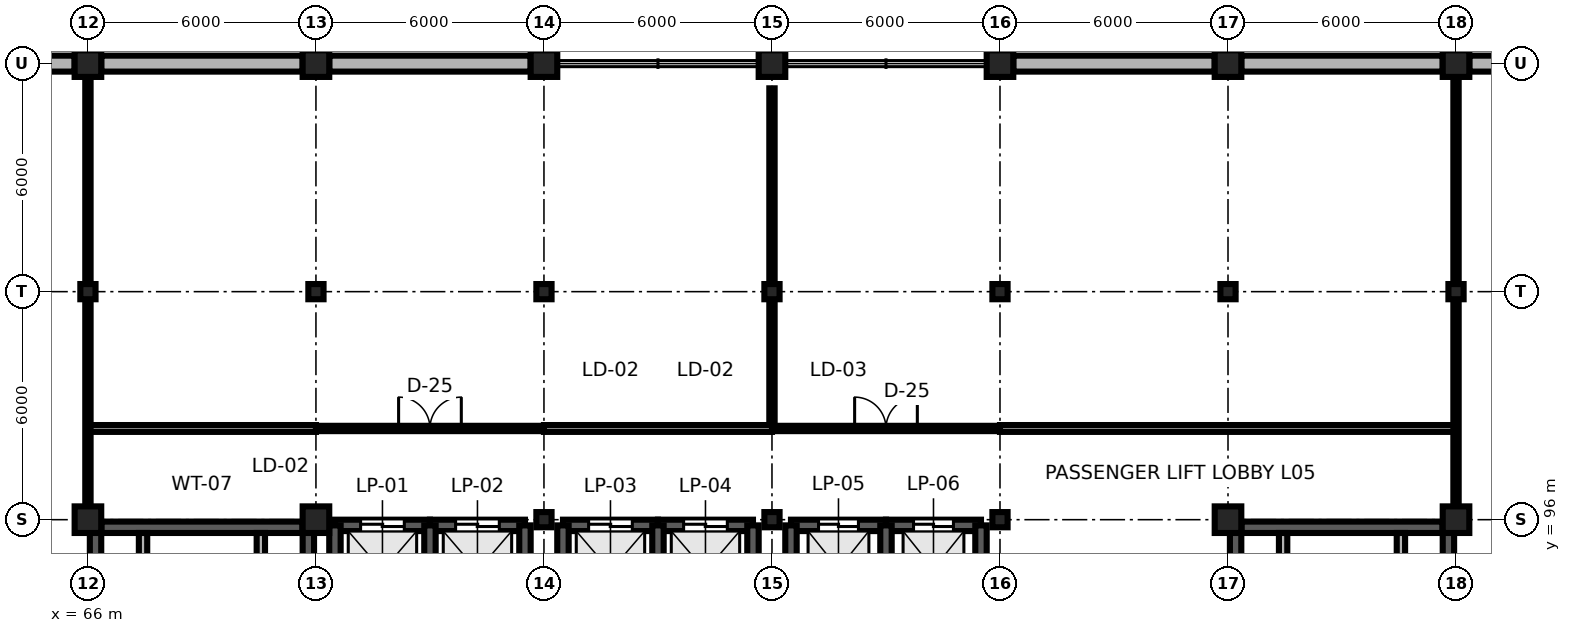
"""IFC4 building model, lengths in metres.
Left out: names, types, materials, properties, quantities, classifications, styles, units other than length and angle.
Written with IfcOpenShell. Run it as: python <this file> out.ifc"""

import sys

from ifc_helpers import new_model, si_unit, direction, frame, frame_2d, origin, origin_2d, place, context, subcontext, project, spatial, rectangle, i_section, extrude, element, fill, save


model = new_model("IFC4")
c1 = context("Model", 3, precision=1e-05, world=origin(), true_north=direction((0.0, 1.0)))
c2 = subcontext(c1, "Body", "Model", "MODEL_VIEW")
j1 = project(units=[si_unit("LENGTHUNIT", "METRE"), si_unit("PLANEANGLEUNIT", "RADIAN")], contexts=[c1])
p1 = place(None, origin())
s1 = spatial("IfcSite", under=j1, at=p1, CompositionType="ELEMENT")
p2 = place(p1, origin())
s2 = spatial("IfcBuilding", under=s1, at=p2, CompositionType="ELEMENT")
p3 = place(p2, frame((0.0, 0.0, 21.0)))
s3 = spatial("IfcBuildingStorey", under=s2, at=p3, CompositionType="ELEMENT", Elevation=21.0)
for number, where, z_axis, x_axis in (
    (1, (66.0, 96.0, 0.0), (0.0, 0.0, 1.0), (1.0, 0.0, 0.0)),
    (2, (72.0, 96.0, 0.0), (0.0, 0.0, 1.0), (1.0, 0.0, 0.0)),
):
    element("IfcColumn", number, at=place(p3, frame(where, z_axis=z_axis, x_axis=x_axis)), inside=s3, PredefinedType="COLUMN", context=c2, shape_type="SweptSolid", body=[
        extrude(rectangle(XDim=0.7, YDim=0.7, at=origin_2d()), origin(), (0.0, 0.0, 1.0), 3.9),
    ])
for number, where, z_axis, x_axis in (
    (3, (78.0, 96.0, 0.0), (0.0, 0.0, 1.0), (1.0, 0.0, 0.0)),
    (4, (84.0, 96.0, 0.0), (0.0, 0.0, 1.0), (1.0, 0.0, 0.0)),
    (5, (90.0, 96.0, 0.0), (0.0, 0.0, 1.0), (1.0, 0.0, 0.0)),
):
    element("IfcColumn", number, at=place(p3, frame(where, z_axis=z_axis, x_axis=x_axis)), inside=s3, PredefinedType="COLUMN", context=c2, shape_type="SweptSolid", body=[
        extrude(i_section(OverallWidth=0.4, OverallDepth=0.4, WebThickness=0.013, FlangeThickness=0.021, FilletRadius=0.022, at=origin_2d()), origin(), (0.0, 0.0, 1.0), 3.9),
    ])
for number, where, z_axis, x_axis in (
    (6, (96.0, 96.0, 0.0), (0.0, 0.0, 1.0), (1.0, 0.0, 0.0)),
    (7, (102.0, 96.0, 0.0), (0.0, 0.0, 1.0), (1.0, 0.0, 0.0)),
):
    element("IfcColumn", number, at=place(p3, frame(where, z_axis=z_axis, x_axis=x_axis)), inside=s3, PredefinedType="COLUMN", context=c2, shape_type="SweptSolid", body=[
        extrude(rectangle(XDim=0.7, YDim=0.7, at=origin_2d()), origin(), (0.0, 0.0, 1.0), 3.9),
    ])
for number, where, z_axis, x_axis in (
    (8, (66.0, 102.0, 0.0), (0.0, 0.0, 1.0), (1.0, 0.0, 0.0)),
    (9, (72.0, 102.0, 0.0), (0.0, 0.0, 1.0), (1.0, 0.0, 0.0)),
    (10, (78.0, 102.0, 0.0), (0.0, 0.0, 1.0), (1.0, 0.0, 0.0)),
    (11, (84.0, 102.0, 0.0), (0.0, 0.0, 1.0), (1.0, 0.0, 0.0)),
    (12, (90.0, 102.0, 0.0), (0.0, 0.0, 1.0), (1.0, 0.0, 0.0)),
    (13, (96.0, 102.0, 0.0), (0.0, 0.0, 1.0), (1.0, 0.0, 0.0)),
    (14, (102.0, 102.0, 0.0), (0.0, 0.0, 1.0), (1.0, 0.0, 0.0)),
):
    element("IfcColumn", number, at=place(p3, frame(where, z_axis=z_axis, x_axis=x_axis)), inside=s3, PredefinedType="COLUMN", context=c2, shape_type="SweptSolid", body=[
        extrude(i_section(OverallWidth=0.4, OverallDepth=0.4, WebThickness=0.013, FlangeThickness=0.021, FilletRadius=0.022, at=origin_2d()), origin(), (0.0, 0.0, 1.0), 3.9),
    ])
for number, where, z_axis, x_axis in (
    (15, (66.0, 108.0, 0.0), (0.0, 0.0, 1.0), (1.0, 0.0, 0.0)),
    (16, (72.0, 108.0, 0.0), (0.0, 0.0, 1.0), (1.0, 0.0, 0.0)),
    (17, (78.0, 108.0, 0.0), (0.0, 0.0, 1.0), (1.0, 0.0, 0.0)),
    (18, (84.0, 108.0, 0.0), (0.0, 0.0, 1.0), (1.0, 0.0, 0.0)),
    (19, (90.0, 108.0, 0.0), (0.0, 0.0, 1.0), (1.0, 0.0, 0.0)),
    (20, (96.0, 108.0, 0.0), (0.0, 0.0, 1.0), (1.0, 0.0, 0.0)),
    (21, (102.0, 108.0, 0.0), (0.0, 0.0, 1.0), (1.0, 0.0, 0.0)),
):
    element("IfcColumn", number, at=place(p3, frame(where, z_axis=z_axis, x_axis=x_axis)), inside=s3, PredefinedType="COLUMN", context=c2, shape_type="SweptSolid", body=[
        extrude(rectangle(XDim=0.7, YDim=0.7, at=origin_2d()), origin(), (0.0, 0.0, 1.0), 3.9),
    ])
for number, where, z_axis, x_axis in (
    (22, (60.35, 108.0, 0.0), (0.0, 0.0, 1.0), (1.0, 0.0, 0.0)),
    (23, (66.35, 108.0, 0.0), (0.0, 0.0, 1.0), (1.0, 0.0, 0.0)),
    (24, (72.35, 108.0, 0.0), (0.0, 0.0, 1.0), (1.0, 0.0, 0.0)),
    (25, (90.35, 108.0, 0.0), (0.0, 0.0, 1.0), (1.0, 0.0, 0.0)),
    (26, (96.35, 108.0, 0.0), (0.0, 0.0, 1.0), (1.0, 0.0, 0.0)),
    (27, (102.35, 108.0, 0.0), (0.0, 0.0, 1.0), (1.0, 0.0, 0.0)),
):
    element("IfcWall", number, at=place(p3, frame(where, z_axis=z_axis, x_axis=x_axis)), inside=s3, PredefinedType="SOLIDWALL", context=c2, shape_type="SweptSolid", body=[
        extrude(rectangle(XDim=5.3, YDim=0.42, at=frame_2d((2.65, 0.0))), origin(), (0.0, 0.0, 1.0), 3.28),
    ])
p4 = place(p3, frame((66.35, 95.8, 0.0), z_axis=(0.0, 0.0, 1.0), x_axis=(1.0, 0.0, 0.0)))
e28 = element("IfcWall", 28, at=p4, inside=s3, PredefinedType="SHEAR", context=c2, shape_type="SweptSolid", body=[
    extrude(rectangle(XDim=5.3, YDim=0.3, at=frame_2d((2.65, 0.0))), origin(), (0.0, 0.0, 1.0), 3.74),
])
for number, where, z_axis, x_axis in (
    (29, (66.2, 84.0, 0.0), (0.0, 0.0, 1.0), (0.0, 1.0, 0.0)),
    (30, (71.8, 84.0, 0.0), (0.0, 0.0, 1.0), (0.0, 1.0, 0.0)),
):
    element("IfcWall", number, at=place(p3, frame(where, z_axis=z_axis, x_axis=x_axis)), inside=s3, PredefinedType="SHEAR", context=c2, shape_type="SweptSolid", body=[
        extrude(rectangle(XDim=11.8, YDim=0.3, at=frame_2d((5.9, 0.0))), origin(), (0.0, 0.0, 1.0), 3.74),
    ])
for number, where, z_axis, x_axis in (
    (31, (67.45, 94.4, 0.0), (0.0, 0.0, 1.0), (0.0, 1.0, 0.0)),
    (32, (70.55, 94.4, 0.0), (0.0, 0.0, 1.0), (0.0, 1.0, 0.0)),
):
    element("IfcWall", number, at=place(p3, frame(where, z_axis=z_axis, x_axis=x_axis)), inside=s3, PredefinedType="PARTITIONING", context=c2, shape_type="SweptSolid", body=[
        extrude(rectangle(XDim=1.25, YDim=0.22, at=frame_2d((0.625, 0.0))), origin(), (0.0, 0.0, 1.0), 3.74),
    ])
p5 = place(p3, frame((96.35, 95.8, 0.0), z_axis=(0.0, 0.0, 1.0), x_axis=(1.0, 0.0, 0.0)))
e33 = element("IfcWall", 33, at=p5, inside=s3, PredefinedType="SHEAR", context=c2, shape_type="SweptSolid", body=[
    extrude(rectangle(XDim=5.3, YDim=0.3, at=frame_2d((2.65, 0.0))), origin(), (0.0, 0.0, 1.0), 3.74),
])
for number, where, z_axis, x_axis in (
    (34, (96.2, 84.0, 0.0), (0.0, 0.0, 1.0), (0.0, 1.0, 0.0)),
    (35, (101.8, 84.0, 0.0), (0.0, 0.0, 1.0), (0.0, 1.0, 0.0)),
):
    element("IfcWall", number, at=place(p3, frame(where, z_axis=z_axis, x_axis=x_axis)), inside=s3, PredefinedType="SHEAR", context=c2, shape_type="SweptSolid", body=[
        extrude(rectangle(XDim=11.8, YDim=0.3, at=frame_2d((5.9, 0.0))), origin(), (0.0, 0.0, 1.0), 3.74),
    ])
for number, where, z_axis, x_axis in (
    (36, (97.45, 94.4, 0.0), (0.0, 0.0, 1.0), (0.0, 1.0, 0.0)),
    (37, (100.55, 94.4, 0.0), (0.0, 0.0, 1.0), (0.0, 1.0, 0.0)),
):
    element("IfcWall", number, at=place(p3, frame(where, z_axis=z_axis, x_axis=x_axis)), inside=s3, PredefinedType="PARTITIONING", context=c2, shape_type="SweptSolid", body=[
        extrude(rectangle(XDim=1.25, YDim=0.22, at=frame_2d((0.625, 0.0))), origin(), (0.0, 0.0, 1.0), 3.74),
    ])
p6 = place(p3, frame((72.5, 95.85, 0.0), z_axis=(0.0, 0.0, 1.0), x_axis=(1.0, 0.0, 0.0)))
e38 = element("IfcWall", 38, at=p6, inside=s3, PredefinedType="SHEAR", context=c2, shape_type="SweptSolid", body=[
    extrude(rectangle(XDim=2.5, YDim=0.3, at=frame_2d((1.25, 0.0))), origin(), (0.0, 0.0, 1.0), 3.74),
])
p7 = place(p6, frame((0.675, 0.0, 0.0)))
e39 = element("IfcOpeningElement", 39, at=p7, cuts=e38, PredefinedType="OPENING", context=c2, shape_type="SweptSolid", body=[
    extrude(rectangle(XDim=1.15, YDim=2.15, at=frame_2d((0.575, 1.075))), frame((0.0, 0.165, 0.0), z_axis=(0.0, -1.0, 0.0), x_axis=(1.0, 0.0, 0.0)), (0.0, 0.0, 1.0), 0.33),
])
p8 = place(p3, frame((72.5, 92.45, 0.0), z_axis=(0.0, 0.0, 1.0), x_axis=(0.0, 1.0, 0.0)))
e40 = element("IfcWall", 40, at=p8, inside=s3, PredefinedType="SHEAR", context=c2, shape_type="SweptSolid", body=[
    extrude(rectangle(XDim=3.4, YDim=0.3, at=frame_2d((1.7, 0.0))), origin(), (0.0, 0.0, 1.0), 3.74),
])
p9 = place(p3, frame((75.0, 95.85, 0.0), z_axis=(0.0, 0.0, 1.0), x_axis=(1.0, 0.0, 0.0)))
e41 = element("IfcWall", 41, at=p9, inside=s3, PredefinedType="SHEAR", context=c2, shape_type="SweptSolid", body=[
    extrude(rectangle(XDim=2.5, YDim=0.3, at=frame_2d((1.25, 0.0))), origin(), (0.0, 0.0, 1.0), 3.74),
])
p10 = place(p9, frame((0.675, 0.0, 0.0)))
e42 = element("IfcOpeningElement", 42, at=p10, cuts=e41, PredefinedType="OPENING", context=c2, shape_type="SweptSolid", body=[
    extrude(rectangle(XDim=1.15, YDim=2.15, at=frame_2d((0.575, 1.075))), frame((0.0, 0.165, 0.0), z_axis=(0.0, -1.0, 0.0), x_axis=(1.0, 0.0, 0.0)), (0.0, 0.0, 1.0), 0.33),
])
for number, where, z_axis, x_axis in (
    (43, (75.0, 92.45, 0.0), (0.0, 0.0, 1.0), (0.0, 1.0, 0.0)),
    (44, (77.5, 92.45, 0.0), (0.0, 0.0, 1.0), (0.0, 1.0, 0.0)),
):
    element("IfcWall", number, at=place(p3, frame(where, z_axis=z_axis, x_axis=x_axis)), inside=s3, PredefinedType="SHEAR", context=c2, shape_type="SweptSolid", body=[
        extrude(rectangle(XDim=3.4, YDim=0.3, at=frame_2d((1.7, 0.0))), origin(), (0.0, 0.0, 1.0), 3.74),
    ])
p11 = place(p3, frame((78.5, 95.85, 0.0), z_axis=(0.0, 0.0, 1.0), x_axis=(1.0, 0.0, 0.0)))
e45 = element("IfcWall", 45, at=p11, inside=s3, PredefinedType="SHEAR", context=c2, shape_type="SweptSolid", body=[
    extrude(rectangle(XDim=2.5, YDim=0.3, at=frame_2d((1.25, 0.0))), origin(), (0.0, 0.0, 1.0), 3.74),
])
p12 = place(p11, frame((0.675, 0.0, 0.0)))
e46 = element("IfcOpeningElement", 46, at=p12, cuts=e45, PredefinedType="OPENING", context=c2, shape_type="SweptSolid", body=[
    extrude(rectangle(XDim=1.15, YDim=2.15, at=frame_2d((0.575, 1.075))), frame((0.0, 0.165, 0.0), z_axis=(0.0, -1.0, 0.0), x_axis=(1.0, 0.0, 0.0)), (0.0, 0.0, 1.0), 0.33),
])
p13 = place(p3, frame((78.5, 92.45, 0.0), z_axis=(0.0, 0.0, 1.0), x_axis=(0.0, 1.0, 0.0)))
e47 = element("IfcWall", 47, at=p13, inside=s3, PredefinedType="SHEAR", context=c2, shape_type="SweptSolid", body=[
    extrude(rectangle(XDim=3.4, YDim=0.3, at=frame_2d((1.7, 0.0))), origin(), (0.0, 0.0, 1.0), 3.74),
])
p14 = place(p3, frame((81.0, 95.85, 0.0), z_axis=(0.0, 0.0, 1.0), x_axis=(1.0, 0.0, 0.0)))
e48 = element("IfcWall", 48, at=p14, inside=s3, PredefinedType="SHEAR", context=c2, shape_type="SweptSolid", body=[
    extrude(rectangle(XDim=2.5, YDim=0.3, at=frame_2d((1.25, 0.0))), origin(), (0.0, 0.0, 1.0), 3.74),
])
p15 = place(p14, frame((0.675, 0.0, 0.0)))
e49 = element("IfcOpeningElement", 49, at=p15, cuts=e48, PredefinedType="OPENING", context=c2, shape_type="SweptSolid", body=[
    extrude(rectangle(XDim=1.15, YDim=2.15, at=frame_2d((0.575, 1.075))), frame((0.0, 0.165, 0.0), z_axis=(0.0, -1.0, 0.0), x_axis=(1.0, 0.0, 0.0)), (0.0, 0.0, 1.0), 0.33),
])
for number, where, z_axis, x_axis in (
    (50, (81.0, 92.45, 0.0), (0.0, 0.0, 1.0), (0.0, 1.0, 0.0)),
    (51, (83.5, 92.45, 0.0), (0.0, 0.0, 1.0), (0.0, 1.0, 0.0)),
):
    element("IfcWall", number, at=place(p3, frame(where, z_axis=z_axis, x_axis=x_axis)), inside=s3, PredefinedType="SHEAR", context=c2, shape_type="SweptSolid", body=[
        extrude(rectangle(XDim=3.4, YDim=0.3, at=frame_2d((1.7, 0.0))), origin(), (0.0, 0.0, 1.0), 3.74),
    ])
p16 = place(p3, frame((84.5, 95.85, 0.0), z_axis=(0.0, 0.0, 1.0), x_axis=(1.0, 0.0, 0.0)))
e52 = element("IfcWall", 52, at=p16, inside=s3, PredefinedType="SHEAR", context=c2, shape_type="SweptSolid", body=[
    extrude(rectangle(XDim=2.5, YDim=0.3, at=frame_2d((1.25, 0.0))), origin(), (0.0, 0.0, 1.0), 3.74),
])
p17 = place(p16, frame((0.725, 0.0, 0.0)))
e53 = element("IfcOpeningElement", 53, at=p17, cuts=e52, PredefinedType="OPENING", context=c2, shape_type="SweptSolid", body=[
    extrude(rectangle(XDim=1.05, YDim=2.1, at=frame_2d((0.525, 1.05))), frame((0.0, 0.165, 0.0), z_axis=(0.0, -1.0, 0.0), x_axis=(1.0, 0.0, 0.0)), (0.0, 0.0, 1.0), 0.33),
])
p18 = place(p3, frame((84.5, 92.45, 0.0), z_axis=(0.0, 0.0, 1.0), x_axis=(0.0, 1.0, 0.0)))
e54 = element("IfcWall", 54, at=p18, inside=s3, PredefinedType="SHEAR", context=c2, shape_type="SweptSolid", body=[
    extrude(rectangle(XDim=3.4, YDim=0.3, at=frame_2d((1.7, 0.0))), origin(), (0.0, 0.0, 1.0), 3.74),
])
p19 = place(p3, frame((87.0, 95.85, 0.0), z_axis=(0.0, 0.0, 1.0), x_axis=(1.0, 0.0, 0.0)))
e55 = element("IfcWall", 55, at=p19, inside=s3, PredefinedType="SHEAR", context=c2, shape_type="SweptSolid", body=[
    extrude(rectangle(XDim=2.5, YDim=0.3, at=frame_2d((1.25, 0.0))), origin(), (0.0, 0.0, 1.0), 3.74),
])
p20 = place(p19, frame((0.725, 0.0, 0.0)))
e56 = element("IfcOpeningElement", 56, at=p20, cuts=e55, PredefinedType="OPENING", context=c2, shape_type="SweptSolid", body=[
    extrude(rectangle(XDim=1.05, YDim=2.1, at=frame_2d((0.525, 1.05))), frame((0.0, 0.165, 0.0), z_axis=(0.0, -1.0, 0.0), x_axis=(1.0, 0.0, 0.0)), (0.0, 0.0, 1.0), 0.33),
])
for number, where, z_axis, x_axis in (
    (57, (87.0, 92.45, 0.0), (0.0, 0.0, 1.0), (0.0, 1.0, 0.0)),
    (58, (89.5, 92.45, 0.0), (0.0, 0.0, 1.0), (0.0, 1.0, 0.0)),
):
    element("IfcWall", number, at=place(p3, frame(where, z_axis=z_axis, x_axis=x_axis)), inside=s3, PredefinedType="SHEAR", context=c2, shape_type="SweptSolid", body=[
        extrude(rectangle(XDim=3.4, YDim=0.3, at=frame_2d((1.7, 0.0))), origin(), (0.0, 0.0, 1.0), 3.74),
    ])
p21 = place(p3, frame((72.0, 98.4, 0.0), z_axis=(0.0, 0.0, 1.0), x_axis=(1.0, 0.0, 0.0)))
e59 = element("IfcWall", 59, at=p21, inside=s3, PredefinedType="PARTITIONING", context=c2, shape_type="SweptSolid", body=[
    extrude(rectangle(XDim=6.0, YDim=0.14, at=frame_2d((3.0, 0.0))), origin(), (0.0, 0.0, 1.0), 3.7),
])
p22 = place(p21, frame((2.175, 0.0, 0.0)))
e60 = element("IfcOpeningElement", 60, at=p22, cuts=e59, PredefinedType="OPENING", context=c2, shape_type="SweptSolid", body=[
    extrude(rectangle(XDim=1.65, YDim=2.35, at=frame_2d((0.825, 1.175))), frame((0.0, 0.085, 0.0), z_axis=(0.0, -1.0, 0.0), x_axis=(1.0, 0.0, 0.0)), (0.0, 0.0, 1.0), 0.17),
])
p23 = place(p3, frame((84.0, 98.4, 0.0), z_axis=(0.0, 0.0, 1.0), x_axis=(1.0, 0.0, 0.0)))
e61 = element("IfcWall", 61, at=p23, inside=s3, PredefinedType="PARTITIONING", context=c2, shape_type="SweptSolid", body=[
    extrude(rectangle(XDim=6.0, YDim=0.14, at=frame_2d((3.0, 0.0))), origin(), (0.0, 0.0, 1.0), 3.7),
])
p24 = place(p23, frame((2.175, 0.0, 0.0)))
e62 = element("IfcOpeningElement", 62, at=p24, cuts=e61, PredefinedType="OPENING", context=c2, shape_type="SweptSolid", body=[
    extrude(rectangle(XDim=1.65, YDim=2.35, at=frame_2d((0.825, 1.175))), frame((0.0, 0.085, 0.0), z_axis=(0.0, -1.0, 0.0), x_axis=(1.0, 0.0, 0.0)), (0.0, 0.0, 1.0), 0.17),
])
p25 = place(p3, frame((84.0, 98.4, 0.0), z_axis=(0.0, 0.0, 1.0), x_axis=(0.0, 1.0, 0.0)))
e63 = element("IfcWall", 63, at=p25, inside=s3, PredefinedType="PARTITIONING", context=c2, shape_type="SweptSolid", body=[
    extrude(rectangle(XDim=8.95, YDim=0.14, at=frame_2d((4.475, 0.0))), origin(), (0.0, 0.0, 1.0), 3.312),
])
for number, where, z_axis, x_axis in (
    (64, (66.0, 98.4, 0.0), (0.0, 0.0, 1.0), (1.0, 0.0, 0.0)),
    (65, (78.0, 98.4, 0.0), (0.0, 0.0, 1.0), (1.0, 0.0, 0.0)),
):
    element("IfcWall", number, at=place(p3, frame(where, z_axis=z_axis, x_axis=x_axis)), inside=s3, PredefinedType="PARTITIONING", context=c2, shape_type="SweptSolid", body=[
        extrude(rectangle(XDim=6.0, YDim=0.18, at=frame_2d((3.0, 0.0))), origin(), (0.0, 0.0, 1.0), 3.7),
    ])
p26 = place(p3, frame((90.0, 98.4, 0.0), z_axis=(0.0, 0.0, 1.0), x_axis=(1.0, 0.0, 0.0)))
e66 = element("IfcWall", 66, at=p26, inside=s3, PredefinedType="PARTITIONING", context=c2, shape_type="SweptSolid", body=[
    extrude(rectangle(XDim=12.0, YDim=0.18, at=frame_2d((6.0, 0.0))), origin(), (0.0, 0.0, 1.0), 3.7),
])
for number, where, z_axis, x_axis in (
    (67, (66.0, 96.35, 0.0), (0.0, 0.0, 1.0), (0.0, 1.0, 0.0)),
    (68, (102.0, 96.35, 0.0), (0.0, 0.0, 1.0), (0.0, 1.0, 0.0)),
):
    element("IfcWall", number, at=place(p3, frame(where, z_axis=z_axis, x_axis=x_axis)), inside=s3, PredefinedType="PARTITIONING", context=c2, shape_type="SweptSolid", body=[
        extrude(rectangle(XDim=11.3, YDim=0.14, at=frame_2d((5.65, 0.0))), origin(), (0.0, 0.0, 1.0), 3.312),
    ])
p27 = place(p7, origin())
e69 = element("IfcDoor", 69, at=p27, inside=s3, OperationType="DOUBLE_DOOR_SLIDING", PredefinedType="DOOR", context=c2, shape_type="SweptSolid", body=[
    extrude(rectangle(XDim=1.15, YDim=2.15, at=frame_2d((0.575, 1.075))), frame((0.0, 0.025, 0.0), z_axis=(0.0, -1.0, 0.0), x_axis=(1.0, 0.0, 0.0)), (0.0, 0.0, 1.0), 0.05),
])
fill(e39, e69)
p28 = place(p10, origin())
e70 = element("IfcDoor", 70, at=p28, inside=s3, OperationType="DOUBLE_DOOR_SLIDING", PredefinedType="DOOR", context=c2, shape_type="SweptSolid", body=[
    extrude(rectangle(XDim=1.15, YDim=2.15, at=frame_2d((0.575, 1.075))), frame((0.0, 0.025, 0.0), z_axis=(0.0, -1.0, 0.0), x_axis=(1.0, 0.0, 0.0)), (0.0, 0.0, 1.0), 0.05),
])
fill(e42, e70)
p29 = place(p12, origin())
e71 = element("IfcDoor", 71, at=p29, inside=s3, OperationType="DOUBLE_DOOR_SLIDING", PredefinedType="DOOR", context=c2, shape_type="SweptSolid", body=[
    extrude(rectangle(XDim=1.15, YDim=2.15, at=frame_2d((0.575, 1.075))), frame((0.0, 0.025, 0.0), z_axis=(0.0, -1.0, 0.0), x_axis=(1.0, 0.0, 0.0)), (0.0, 0.0, 1.0), 0.05),
])
fill(e46, e71)
p30 = place(p15, origin())
e72 = element("IfcDoor", 72, at=p30, inside=s3, OperationType="DOUBLE_DOOR_SLIDING", PredefinedType="DOOR", context=c2, shape_type="SweptSolid", body=[
    extrude(rectangle(XDim=1.15, YDim=2.15, at=frame_2d((0.575, 1.075))), frame((0.0, 0.025, 0.0), z_axis=(0.0, -1.0, 0.0), x_axis=(1.0, 0.0, 0.0)), (0.0, 0.0, 1.0), 0.05),
])
fill(e49, e72)
p31 = place(p17, origin())
e73 = element("IfcDoor", 73, at=p31, inside=s3, OperationType="DOUBLE_DOOR_SLIDING", PredefinedType="DOOR", context=c2, shape_type="SweptSolid", body=[
    extrude(rectangle(XDim=1.05, YDim=2.1, at=frame_2d((0.525, 1.05))), frame((0.0, 0.025, 0.0), z_axis=(0.0, -1.0, 0.0), x_axis=(1.0, 0.0, 0.0)), (0.0, 0.0, 1.0), 0.05),
])
fill(e53, e73)
p32 = place(p20, origin())
e74 = element("IfcDoor", 74, at=p32, inside=s3, OperationType="DOUBLE_DOOR_SLIDING", PredefinedType="DOOR", context=c2, shape_type="SweptSolid", body=[
    extrude(rectangle(XDim=1.05, YDim=2.1, at=frame_2d((0.525, 1.05))), frame((0.0, 0.025, 0.0), z_axis=(0.0, -1.0, 0.0), x_axis=(1.0, 0.0, 0.0)), (0.0, 0.0, 1.0), 0.05),
])
fill(e56, e74)
p33 = place(p22, origin())
e75 = element("IfcDoor", 75, at=p33, inside=s3, OperationType="DOUBLE_DOOR_SINGLE_SWING", PredefinedType="DOOR", context=c2, shape_type="SweptSolid", body=[
    extrude(rectangle(XDim=1.65, YDim=2.35, at=frame_2d((0.825, 1.175))), frame((0.0, 0.025, 0.0), z_axis=(0.0, -1.0, 0.0), x_axis=(1.0, 0.0, 0.0)), (0.0, 0.0, 1.0), 0.05),
])
fill(e60, e75)
p34 = place(p24, origin())
e76 = element("IfcDoor", 76, at=p34, inside=s3, OperationType="DOUBLE_DOOR_SINGLE_SWING", PredefinedType="DOOR", context=c2, shape_type="SweptSolid", body=[
    extrude(rectangle(XDim=1.65, YDim=2.35, at=frame_2d((0.825, 1.175))), frame((0.0, 0.025, 0.0), z_axis=(0.0, -1.0, 0.0), x_axis=(1.0, 0.0, 0.0)), (0.0, 0.0, 1.0), 0.05),
])
fill(e62, e76)
save(model, sys.argv[1])
